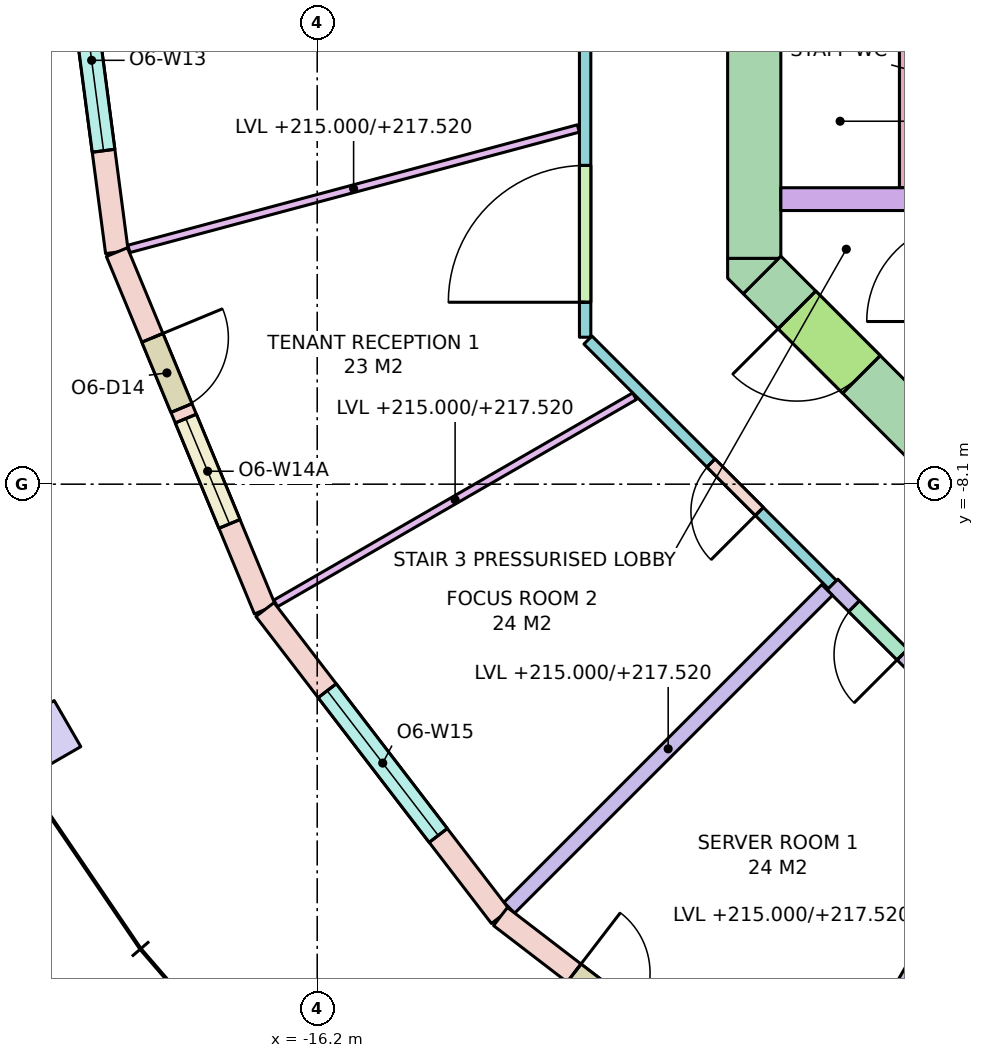
"""IFC4 building model, lengths in metres.
Left out: names, types, materials, properties, quantities, classifications, styles, units other than length and angle.
Written with IfcOpenShell. Run it as: python <this file> out.ifc"""

import sys

from ifc_helpers import new_model, si_unit, direction, frame, frame_2d, origin, origin_2d, place, context, subcontext, project, spatial, polyline, rectangle, outline, extrude, element, fill, save


model = new_model("IFC4")
c1 = context("Model", 3, precision=1e-05, world=origin(), true_north=direction((0.0, 1.0)))
c2 = subcontext(c1, "Body", "Model", "MODEL_VIEW")
j1 = project(units=[si_unit("LENGTHUNIT", "METRE"), si_unit("PLANEANGLEUNIT", "RADIAN")], contexts=[c1])
p1 = place(None, origin())
s1 = spatial("IfcSite", under=j1, at=p1, CompositionType="ELEMENT")
p2 = place(p1, origin())
s2 = spatial("IfcBuilding", under=s1, at=p2, CompositionType="ELEMENT")
p3 = place(p2, frame((0.0, 0.0, 215.0)))
s3 = spatial("IfcBuildingStorey", under=s2, at=p3, CompositionType="ELEMENT", Elevation=215.0)
p4 = place(p3, frame((-19.919, -11.5, 0.0), z_axis=(0.0, 0.0, 1.0), x_axis=(0.5, -0.866025403784, 0.0)))
e1 = element("IfcColumn", 1, at=p4, inside=s3, PredefinedType="COLUMN", context=c2, shape_type="SweptSolid", body=[
    extrude(rectangle(XDim=0.7, YDim=1.0, at=origin_2d()), origin(), (0.0, 0.0, 1.0), 3.7),
])
p5 = place(p3, frame((-10.45, -5.13, -0.28), z_axis=(0.0, 0.0, 1.0), x_axis=(0.0, 1.0, 0.0)))
e2 = element("IfcWall", 2, at=p5, inside=s3, PredefinedType="SHEAR", context=c2, shape_type="SweptSolid", body=[
    extrude(rectangle(XDim=10.26, YDim=0.7, at=frame_2d((5.13, 0.0))), origin(), (0.0, 0.0, 1.0), 3.7),
])
p6 = place(p5, frame((4.13, 0.0, 0.28)))
e3 = element("IfcOpeningElement", 3, at=p6, cuts=e2, PredefinedType="OPENING", context=c2, shape_type="SweptSolid", body=[
    extrude(rectangle(XDim=2.0, YDim=2.1, at=frame_2d((1.0, 1.05))), frame((0.0, 0.36, 0.0), z_axis=(0.0, -1.0, 0.0), x_axis=(1.0, 0.0, 0.0)), (0.0, 0.0, 1.0), 0.72),
])
p7 = place(p3, frame((-7.347, -8.347, -0.28), z_axis=(0.0, 0.0, 1.0), x_axis=(-0.707106781187, 0.707106781187, 0.0)))
e4 = element("IfcWall", 4, at=p7, inside=s3, PredefinedType="SHEAR", context=c2, shape_type="SweptSolid", body=[
    extrude(rectangle(XDim=4.243, YDim=0.7, at=frame_2d((2.121, 0.0))), origin(), (0.0, 0.0, 1.0), 3.7),
])
p8 = place(p7, frame((2.393, 0.0, 0.28)))
e5 = element("IfcOpeningElement", 5, at=p8, cuts=e4, PredefinedType="OPENING", context=c2, shape_type="SweptSolid", body=[
    extrude(rectangle(XDim=1.2, YDim=2.1, at=frame_2d((0.6, 1.05))), frame((0.0, 0.36, 0.0), z_axis=(0.0, -1.0, 0.0), x_axis=(1.0, 0.0, 0.0)), (0.0, 0.0, 1.0), 0.72),
])
p9 = place(p3, frame((0.0, 0.0, -0.28)))
e6 = element("IfcWall", 6, at=p9, inside=s3, PredefinedType="SHEAR", context=c2, shape_type="SweptSolid", body=[
    extrude(outline(polyline([(-10.8, -5.39), (-10.8, -5.13), (-10.8, -5.13), (-10.13, -5.13), (-10.595, -5.595), (-10.595, -5.595), (-10.595, -5.595), (-10.8, -5.39)])), origin(), (0.0, 0.0, 1.0), 3.7),
])
p10 = place(p3, frame((-10.1, -4.35, 0.0), z_axis=(0.0, 0.0, 1.0), x_axis=(1.0, 0.0, 0.0)))
e7 = element("IfcWall", 7, at=p10, inside=s3, PredefinedType="SOLIDWALL", context=c2, shape_type="SweptSolid", body=[
    extrude(rectangle(XDim=8.1, YDim=0.3, at=frame_2d((4.05, 0.0))), origin(), (0.0, 0.0, 1.0), 3.42),
])
p11 = place(p3, frame((-19.5, 0.0, 0.0), z_axis=(0.0, 0.0, 1.0), x_axis=(0.130495451964, -0.99144890792, 0.0)))
e8 = element("IfcWall", 8, at=p11, inside=s3, PredefinedType="STANDARD", context=c2, shape_type="SweptSolid", body=[
    extrude(rectangle(XDim=5.091, YDim=0.3, at=frame_2d((2.545, 0.0))), origin(), (0.0, 0.0, 1.0), 3.42),
])
p12 = place(p11, frame((1.345, 0.0, 0.8)))
e9 = element("IfcOpeningElement", 9, at=p12, cuts=e8, PredefinedType="OPENING", context=c2, shape_type="SweptSolid", body=[
    extrude(rectangle(XDim=2.4, YDim=2.4, at=frame_2d((1.2, 1.2))), frame((0.0, 0.16, 0.0), z_axis=(0.0, -1.0, 0.0), x_axis=(1.0, 0.0, 0.0)), (0.0, 0.0, 1.0), 0.32),
])
p13 = place(p3, frame((-18.836, -5.047, 0.0), z_axis=(0.0, 0.0, 1.0), x_axis=(0.382724538613, -0.923862504675, 0.0)))
e10 = element("IfcWall", 10, at=p13, inside=s3, PredefinedType="STANDARD", context=c2, shape_type="SweptSolid", body=[
    extrude(rectangle(XDim=5.091, YDim=0.3, at=frame_2d((2.545, 0.0))), origin(), (0.0, 0.0, 1.0), 3.42),
])
p14 = place(p13, frame((1.22, 0.0, 0.0)))
e11 = element("IfcOpeningElement", 11, at=p14, cuts=e10, PredefinedType="OPENING", context=c2, shape_type="SweptSolid", body=[
    extrude(rectangle(XDim=1.0, YDim=2.4, at=frame_2d((0.5, 1.2))), frame((0.0, 0.16, 0.0), z_axis=(0.0, -1.0, 0.0), x_axis=(1.0, 0.0, 0.0)), (0.0, 0.0, 1.0), 0.32),
])
p15 = place(p13, frame((2.37, 0.0, 0.8)))
e12 = element("IfcOpeningElement", 12, at=p15, cuts=e10, PredefinedType="OPENING", context=c2, shape_type="SweptSolid", body=[
    extrude(rectangle(XDim=1.5, YDim=2.4, at=frame_2d((0.75, 1.2))), frame((0.0, 0.16, 0.0), z_axis=(0.0, -1.0, 0.0), x_axis=(1.0, 0.0, 0.0)), (0.0, 0.0, 1.0), 0.32),
])
p16 = place(p3, frame((-16.887, -9.75, 0.0), z_axis=(0.0, 0.0, 1.0), x_axis=(0.608757714995, -0.79335619014, 0.0)))
e13 = element("IfcWall", 13, at=p16, inside=s3, PredefinedType="STANDARD", context=c2, shape_type="SweptSolid", body=[
    extrude(rectangle(XDim=5.091, YDim=0.3, at=frame_2d((2.545, 0.0))), origin(), (0.0, 0.0, 1.0), 3.42),
])
p17 = place(p16, frame((1.345, 0.0, 0.8)))
e14 = element("IfcOpeningElement", 14, at=p17, cuts=e13, PredefinedType="OPENING", context=c2, shape_type="SweptSolid", body=[
    extrude(rectangle(XDim=2.4, YDim=2.4, at=frame_2d((1.2, 1.2))), frame((0.0, 0.16, 0.0), z_axis=(0.0, -1.0, 0.0), x_axis=(1.0, 0.0, 0.0)), (0.0, 0.0, 1.0), 0.32),
])
p18 = place(p3, frame((-13.789, -13.789, 0.0), z_axis=(0.0, 0.0, 1.0), x_axis=(0.79335619014, -0.608757714995, 0.0)))
e15 = element("IfcWall", 15, at=p18, inside=s3, PredefinedType="STANDARD", context=c2, shape_type="SweptSolid", body=[
    extrude(rectangle(XDim=5.091, YDim=0.3, at=frame_2d((2.545, 0.0))), origin(), (0.0, 0.0, 1.0), 3.42),
])
p19 = place(p18, frame((1.22, 0.0, 0.0)))
e16 = element("IfcOpeningElement", 16, at=p19, cuts=e15, PredefinedType="OPENING", context=c2, shape_type="SweptSolid", body=[
    extrude(rectangle(XDim=1.0, YDim=2.4, at=frame_2d((0.5, 1.2))), frame((0.0, 0.16, 0.0), z_axis=(0.0, -1.0, 0.0), x_axis=(1.0, 0.0, 0.0)), (0.0, 0.0, 1.0), 0.32),
])
p20 = place(p18, frame((2.37, 0.0, 0.8)))
e17 = element("IfcOpeningElement", 17, at=p20, cuts=e15, PredefinedType="OPENING", context=c2, shape_type="SweptSolid", body=[
    extrude(rectangle(XDim=1.5, YDim=2.4, at=frame_2d((0.75, 1.2))), frame((0.0, 0.16, 0.0), z_axis=(0.0, -1.0, 0.0), x_axis=(1.0, 0.0, 0.0)), (0.0, 0.0, 1.0), 0.32),
])
p21 = place(p3, frame((-8.465, -4.2, 0.0), z_axis=(0.0, 0.0, 1.0), x_axis=(0.0, 1.0, 0.0)))
e18 = element("IfcWall", 18, at=p21, inside=s3, PredefinedType="PARTITIONING", context=c2, shape_type="SweptSolid", body=[
    extrude(rectangle(XDim=2.55, YDim=0.15, at=frame_2d((1.275, 0.0))), origin(), (0.0, 0.0, 1.0), 3.42),
])
p22 = place(p3, frame((-8.216, -10.625, 0.0), z_axis=(0.0, 0.0, 1.0), x_axis=(-0.70717842684, 0.707035128273, 0.0)))
e19 = element("IfcWall", 19, at=p22, inside=s3, PredefinedType="PARTITIONING", context=c2, shape_type="SweptSolid", body=[
    extrude(rectangle(XDim=1.704, YDim=0.2, at=frame_2d((0.852, 0.0))), origin(), (0.0, 0.0, 1.0), 2.52),
])
p23 = place(p22, frame((0.402, 0.0, 0.0)))
e20 = element("IfcOpeningElement", 20, at=p23, cuts=e19, PredefinedType="OPENING", context=c2, shape_type="SweptSolid", body=[
    extrude(rectangle(XDim=0.9, YDim=2.1, at=frame_2d((0.45, 1.05))), frame((0.0, 0.11, 0.0), z_axis=(0.0, -1.0, 0.0), x_axis=(1.0, 0.0, 0.0)), (0.0, 0.0, 1.0), 0.22),
])
p24 = place(p3, frame((-9.421, -9.421, 0.0), z_axis=(0.0, 0.0, 1.0), x_axis=(-0.707079950597, 0.707133610758, 0.0)))
e21 = element("IfcWall", 21, at=p24, inside=s3, PredefinedType="PARTITIONING", context=c2, shape_type="SweptSolid", body=[
    extrude(rectangle(XDim=4.55, YDim=0.15, at=frame_2d((2.275, 0.0))), origin(), (0.0, 0.0, 1.0), 2.52),
])
p25 = place(p24, frame((1.361, 0.0, 0.0)))
e22 = element("IfcOpeningElement", 22, at=p25, cuts=e21, PredefinedType="OPENING", context=c2, shape_type="SweptSolid", body=[
    extrude(rectangle(XDim=0.9, YDim=2.1, at=frame_2d((0.45, 1.05))), frame((0.0, 0.085, 0.0), z_axis=(0.0, -1.0, 0.0), x_axis=(1.0, 0.0, 0.0)), (0.0, 0.0, 1.0), 0.17),
])
p26 = place(p3, frame((-12.675, -6.167, 0.0), z_axis=(0.0, 0.0, 1.0), x_axis=(0.0, 1.0, 0.0)))
e23 = element("IfcWall", 23, at=p26, inside=s3, PredefinedType="PARTITIONING", context=c2, shape_type="SweptSolid", body=[
    extrude(rectangle(XDim=12.333, YDim=0.15, at=frame_2d((6.167, 0.0))), origin(), (0.0, 0.0, 1.0), 2.52),
])
p27 = place(p26, frame((10.473, 0.0, 0.0)))
e24 = element("IfcOpeningElement", 24, at=p27, cuts=e23, PredefinedType="OPENING", context=c2, shape_type="SweptSolid", body=[
    extrude(rectangle(XDim=0.9, YDim=2.1, at=frame_2d((0.45, 1.05))), frame((0.0, 0.085, 0.0), z_axis=(0.0, -1.0, 0.0), x_axis=(1.0, 0.0, 0.0)), (0.0, 0.0, 1.0), 0.17),
])
p28 = place(p26, frame((7.416, 0.0, 0.0)))
e25 = element("IfcOpeningElement", 25, at=p28, cuts=e23, PredefinedType="OPENING", context=c2, shape_type="SweptSolid", body=[
    extrude(rectangle(XDim=0.9, YDim=2.1, at=frame_2d((0.45, 1.05))), frame((0.0, 0.085, 0.0), z_axis=(0.0, -1.0, 0.0), x_axis=(1.0, 0.0, 0.0)), (0.0, 0.0, 1.0), 0.17),
])
p29 = place(p26, frame((4.018, 0.0, 0.0)))
e26 = element("IfcOpeningElement", 26, at=p29, cuts=e23, PredefinedType="OPENING", context=c2, shape_type="SweptSolid", body=[
    extrude(rectangle(XDim=0.9, YDim=2.1, at=frame_2d((0.45, 1.05))), frame((0.0, 0.085, 0.0), z_axis=(0.0, -1.0, 0.0), x_axis=(1.0, 0.0, 0.0)), (0.0, 0.0, 1.0), 0.17),
])
p30 = place(p26, frame((0.46, 0.0, 0.0)))
e27 = element("IfcOpeningElement", 27, at=p30, cuts=e23, PredefinedType="OPENING", context=c2, shape_type="SweptSolid", body=[
    extrude(rectangle(XDim=1.8, YDim=2.1, at=frame_2d((0.9, 1.05))), frame((0.0, 0.085, 0.0), z_axis=(0.0, -1.0, 0.0), x_axis=(1.0, 0.0, 0.0)), (0.0, 0.0, 1.0), 0.17),
])
p31 = place(p3, frame((-12.764, -3.42, 0.0), z_axis=(0.0, 0.0, 1.0), x_axis=(-0.965925800266, -0.258819142221, 0.0)))
e28 = element("IfcWall", 28, at=p31, inside=s3, PredefinedType="PARTITIONING", context=c2, shape_type="SweptSolid", body=[
    extrude(rectangle(XDim=6.122, YDim=0.1, at=frame_2d((3.061, 0.0))), origin(), (0.0, 0.0, 1.0), 2.52),
])
p32 = place(p3, frame((-12.025, -6.943, 0.0), z_axis=(0.0, 0.0, 1.0), x_axis=(-0.866029712004, -0.499992537871, 0.0)))
e29 = element("IfcWall", 29, at=p32, inside=s3, PredefinedType="PARTITIONING", context=c2, shape_type="SweptSolid", body=[
    extrude(rectangle(XDim=5.451, YDim=0.1, at=frame_2d((2.726, 0.0))), origin(), (0.0, 0.0, 1.0), 2.52),
])
p33 = place(p3, frame((-9.491, -9.491, 0.0), z_axis=(0.0, 0.0, 1.0), x_axis=(-0.707106781187, -0.707106781187, 0.0)))
e30 = element("IfcWall", 30, at=p33, inside=s3, PredefinedType="PARTITIONING", context=c2, shape_type="SweptSolid", body=[
    extrude(rectangle(XDim=5.914, YDim=0.2, at=frame_2d((2.957, 0.0))), origin(), (0.0, 0.0, 1.0), 2.52),
])
p34 = place(p3, frame((-6.25, -10.824, 0.0), z_axis=(0.0, 0.0, 1.0), x_axis=(-0.500009887181, -0.866019695343, 0.0)))
e31 = element("IfcWall", 31, at=p34, inside=s3, PredefinedType="PARTITIONING", context=c2, shape_type="SweptSolid", body=[
    extrude(rectangle(XDim=6.838, YDim=0.2, at=frame_2d((3.419, 0.0))), origin(), (0.0, 0.0, 1.0), 2.52),
])
p35 = place(p12, origin())
e32 = element("IfcWindow", 32, at=p35, inside=s3, PartitioningType="SINGLE_PANEL", PredefinedType="WINDOW", context=c2, shape_type="SweptSolid", body=[
    extrude(rectangle(XDim=2.4, YDim=2.4, at=frame_2d((1.2, 1.2))), frame((0.0, 0.03, 0.0), z_axis=(0.0, -1.0, 0.0), x_axis=(1.0, 0.0, 0.0)), (0.0, 0.0, 1.0), 0.06),
])
fill(e9, e32)
p36 = place(p14, origin())
e33 = element("IfcDoor", 33, at=p36, inside=s3, OperationType="SINGLE_SWING_LEFT", PredefinedType="DOOR", context=c2, shape_type="SweptSolid", body=[
    extrude(rectangle(XDim=1.0, YDim=2.4, at=frame_2d((0.5, 1.2))), frame((0.0, 0.025, 0.0), z_axis=(0.0, -1.0, 0.0), x_axis=(1.0, 0.0, 0.0)), (0.0, 0.0, 1.0), 0.05),
])
fill(e11, e33)
p37 = place(p15, origin())
e34 = element("IfcWindow", 34, at=p37, inside=s3, PartitioningType="SINGLE_PANEL", PredefinedType="WINDOW", context=c2, shape_type="SweptSolid", body=[
    extrude(rectangle(XDim=1.5, YDim=2.4, at=frame_2d((0.75, 1.2))), frame((0.0, 0.03, 0.0), z_axis=(0.0, -1.0, 0.0), x_axis=(1.0, 0.0, 0.0)), (0.0, 0.0, 1.0), 0.06),
])
fill(e12, e34)
p38 = place(p17, origin())
e35 = element("IfcWindow", 35, at=p38, inside=s3, PartitioningType="SINGLE_PANEL", PredefinedType="WINDOW", context=c2, shape_type="SweptSolid", body=[
    extrude(rectangle(XDim=2.4, YDim=2.4, at=frame_2d((1.2, 1.2))), frame((0.0, 0.03, 0.0), z_axis=(0.0, -1.0, 0.0), x_axis=(1.0, 0.0, 0.0)), (0.0, 0.0, 1.0), 0.06),
])
fill(e14, e35)
p39 = place(p19, origin())
e36 = element("IfcDoor", 36, at=p39, inside=s3, OperationType="SINGLE_SWING_LEFT", PredefinedType="DOOR", context=c2, shape_type="SweptSolid", body=[
    extrude(rectangle(XDim=1.0, YDim=2.4, at=frame_2d((0.5, 1.2))), frame((0.0, 0.025, 0.0), z_axis=(0.0, -1.0, 0.0), x_axis=(1.0, 0.0, 0.0)), (0.0, 0.0, 1.0), 0.05),
])
fill(e16, e36)
p40 = place(p8, origin())
e37 = element("IfcDoor", 37, at=p40, inside=s3, OperationType="SINGLE_SWING_RIGHT", PredefinedType="DOOR", context=c2, shape_type="SweptSolid", body=[
    extrude(rectangle(XDim=1.2, YDim=2.1, at=frame_2d((0.6, 1.05))), frame((0.0, 0.025, 0.0), z_axis=(0.0, -1.0, 0.0), x_axis=(1.0, 0.0, 0.0)), (0.0, 0.0, 1.0), 0.05),
])
fill(e5, e37)
p41 = place(p30, origin())
e38 = element("IfcDoor", 38, at=p41, inside=s3, OperationType="DOUBLE_DOOR_SINGLE_SWING", PredefinedType="DOOR", context=c2, shape_type="SweptSolid", body=[
    extrude(rectangle(XDim=1.8, YDim=2.1, at=frame_2d((0.9, 1.05))), frame((0.0, 0.025, 0.0), z_axis=(0.0, -1.0, 0.0), x_axis=(1.0, 0.0, 0.0)), (0.0, 0.0, 1.0), 0.05),
])
fill(e27, e38)
p42 = place(p25, origin())
e39 = element("IfcDoor", 39, at=p42, inside=s3, OperationType="SINGLE_SWING_LEFT", PredefinedType="DOOR", context=c2, shape_type="SweptSolid", body=[
    extrude(rectangle(XDim=0.9, YDim=2.1, at=frame_2d((0.45, 1.05))), frame((0.0, 0.025, 0.0), z_axis=(0.0, -1.0, 0.0), x_axis=(1.0, 0.0, 0.0)), (0.0, 0.0, 1.0), 0.05),
])
fill(e22, e39)
p43 = place(p23, origin())
e40 = element("IfcDoor", 40, at=p43, inside=s3, OperationType="SINGLE_SWING_LEFT", PredefinedType="DOOR", context=c2, shape_type="SweptSolid", body=[
    extrude(rectangle(XDim=0.9, YDim=2.1, at=frame_2d((0.45, 1.05))), frame((0.0, 0.025, 0.0), z_axis=(0.0, -1.0, 0.0), x_axis=(1.0, 0.0, 0.0)), (0.0, 0.0, 1.0), 0.05),
])
fill(e20, e40)
save(model, sys.argv[1])
